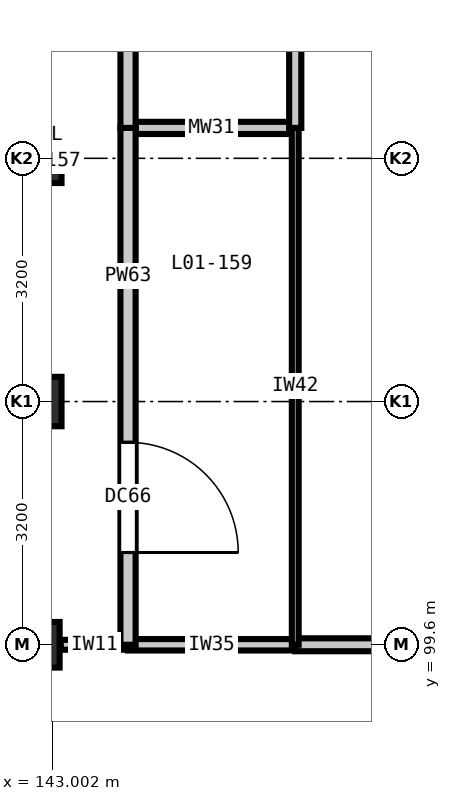
"""IFC4 building model, lengths in metres.
Left out: names, types, materials, properties, quantities, classifications, styles, units other than length and angle.
Written with IfcOpenShell. Run it as: python <this file> out.ifc"""

import sys

from ifc_helpers import new_model, si_unit, direction, frame, frame_2d, origin, origin_2d, place, context, subcontext, project, spatial, rectangle, extrude, element, fill, save


model = new_model("IFC4")
c1 = context("Model", 3, precision=1e-05, world=origin(), true_north=direction((0.0, 1.0)))
c2 = subcontext(c1, "Body", "Model", "MODEL_VIEW")
j1 = project(units=[si_unit("LENGTHUNIT", "METRE"), si_unit("PLANEANGLEUNIT", "RADIAN")], contexts=[c1])
p1 = place(None, origin())
s1 = spatial("IfcSite", under=j1, at=p1, CompositionType="ELEMENT")
p2 = place(p1, origin())
s2 = spatial("IfcBuilding", under=s1, at=p2, CompositionType="ELEMENT")
p3 = place(p2, frame((0.0, 0.0, 5.4)))
s3 = spatial("IfcBuildingStorey", under=s2, at=p3, CompositionType="ELEMENT", Elevation=5.4)
p4 = place(p3, frame((142.8, 99.6, 0.0), z_axis=(0.0, 0.0, 1.0), x_axis=(1.0, 0.0, 0.0)))
e1 = element("IfcColumn", 1, at=p4, inside=s3, PredefinedType="COLUMN", context=c2, shape_type="SweptSolid", body=[
    extrude(rectangle(XDim=0.6, YDim=0.6, at=origin_2d()), origin(), (0.0, 0.0, 1.0), 5.4),
])
for number, where, z_axis, x_axis in (
    (2, (142.8, 102.8, 0.0), (0.0, 0.0, 1.0), (1.0, 0.0, 0.0)),
    (3, (142.8, 106.0, 0.0), (0.0, 0.0, 1.0), (1.0, 0.0, 0.0)),
):
    element("IfcColumn", number, at=place(p3, frame(where, z_axis=z_axis, x_axis=x_axis)), inside=s3, PredefinedType="COLUMN", context=c2, shape_type="SweptSolid", body=[
        extrude(rectangle(XDim=0.65, YDim=0.65, at=origin_2d()), origin(), (0.0, 0.0, 1.0), 5.4),
    ])
p5 = place(p3, frame((143.115, 99.6, 0.0), z_axis=(0.0, 0.0, 1.0), x_axis=(1.0, 0.0, 0.0)))
e4 = element("IfcWall", 4, at=p5, inside=s3, PredefinedType="PARTITIONING", context=c2, shape_type="SweptSolid", body=[
    extrude(rectangle(XDim=0.885, YDim=0.13, at=frame_2d((0.442, 0.0))), origin(), (0.0, 0.0, 1.0), 4.685),
])
p6 = place(p3, frame((144.0, 99.6, 0.0), z_axis=(0.0, 0.0, 1.0), x_axis=(1.0, 0.0, 0.0)))
e5 = element("IfcWall", 5, at=p6, inside=s3, PredefinedType="PARTITIONING", context=c2, shape_type="SweptSolid", body=[
    extrude(rectangle(XDim=2.2, YDim=0.15, at=frame_2d((1.1, 0.0))), origin(), (0.0, 0.0, 1.0), 4.685),
])
p7 = place(p3, frame((146.2, 99.6, 0.0), z_axis=(0.0, 0.0, 1.0), x_axis=(1.0, 0.0, 0.0)))
e6 = element("IfcWall", 6, at=p7, inside=s3, PredefinedType="PARTITIONING", context=c2, shape_type="SweptSolid", body=[
    extrude(rectangle(XDim=2.8, YDim=0.17, at=frame_2d((1.4, 0.0))), origin(), (0.0, 0.0, 1.0), 4.685),
])
p8 = place(p3, frame((144.0, 106.4, 0.0), z_axis=(0.0, 0.0, 1.0), x_axis=(1.0, 0.0, 0.0)))
e7 = element("IfcWall", 7, at=p8, inside=s3, PredefinedType="PLUMBINGWALL", context=c2, shape_type="SweptSolid", body=[
    extrude(rectangle(XDim=2.2, YDim=0.16, at=frame_2d((1.1, 0.0))), origin(), (0.0, 0.0, 1.0), 5.05),
])
p9 = place(p3, frame((144.0, 99.6, 0.0), z_axis=(0.0, 0.0, 1.0), x_axis=(0.0, 1.0, 0.0)))
e8 = element("IfcWall", 8, at=p9, inside=s3, PredefinedType="PARTITIONING", context=c2, shape_type="SweptSolid", body=[
    extrude(rectangle(XDim=6.8, YDim=0.2, at=frame_2d((3.4, 0.0))), origin(), (0.0, 0.0, 1.0), 5.05),
])
p10 = place(p9, frame((1.214, 0.0, 0.0)))
e9 = element("IfcOpeningElement", 9, at=p10, cuts=e8, PredefinedType="OPENING", context=c2, shape_type="SweptSolid", body=[
    extrude(rectangle(XDim=1.45, YDim=2.25, at=frame_2d((0.725, 1.125))), frame((0.0, 0.11, 0.0), z_axis=(0.0, -1.0, 0.0), x_axis=(1.0, 0.0, 0.0)), (0.0, 0.0, 1.0), 0.22),
])
p11 = place(p3, frame((144.0, 106.4, 0.0), z_axis=(0.0, 0.0, 1.0), x_axis=(0.0, 1.0, 0.0)))
e10 = element("IfcWall", 10, at=p11, inside=s3, PredefinedType="PARTITIONING", context=c2, shape_type="SweptSolid", body=[
    extrude(rectangle(XDim=6.8, YDim=0.2, at=frame_2d((3.4, 0.0))), origin(), (0.0, 0.0, 1.0), 5.05),
])
p12 = place(p11, frame((3.912, 0.0, 0.0)))
e11 = element("IfcOpeningElement", 11, at=p12, cuts=e10, PredefinedType="OPENING", context=c2, shape_type="SweptSolid", body=[
    extrude(rectangle(XDim=0.92, YDim=2.1, at=frame_2d((0.46, 1.05))), frame((0.0, 0.11, 0.0), z_axis=(0.0, -1.0, 0.0), x_axis=(1.0, 0.0, 0.0)), (0.0, 0.0, 1.0), 0.22),
])
p13 = place(p3, frame((146.2, 99.6, 0.0), z_axis=(0.0, 0.0, 1.0), x_axis=(0.0, 1.0, 0.0)))
e12 = element("IfcWall", 12, at=p13, inside=s3, PredefinedType="PARTITIONING", context=c2, shape_type="SweptSolid", body=[
    extrude(rectangle(XDim=6.8, YDim=0.09, at=frame_2d((3.4, 0.0))), origin(), (0.0, 0.0, 1.0), 5.05),
])
p14 = place(p3, frame((146.2, 106.4, 0.0), z_axis=(0.0, 0.0, 1.0), x_axis=(0.0, 1.0, 0.0)))
e13 = element("IfcWall", 13, at=p14, inside=s3, PredefinedType="PLUMBINGWALL", context=c2, shape_type="SweptSolid", body=[
    extrude(rectangle(XDim=6.8, YDim=0.16, at=frame_2d((3.4, 0.0))), origin(), (0.0, 0.0, 1.0), 5.05),
])
p15 = place(p10, frame((1.45, 0.0, 0.0), z_axis=(0.0, 0.0, 1.0), x_axis=(-1.0, 0.0, 0.0)))
e14 = element("IfcDoor", 14, at=p15, inside=s3, OperationType="SINGLE_SWING_RIGHT", PredefinedType="DOOR", context=c2, shape_type="SweptSolid", body=[
    extrude(rectangle(XDim=1.45, YDim=2.25, at=frame_2d((0.725, 1.125))), frame((0.0, 0.025, 0.0), z_axis=(0.0, -1.0, 0.0), x_axis=(1.0, 0.0, 0.0)), (0.0, 0.0, 1.0), 0.05),
])
fill(e9, e14)
save(model, sys.argv[1])
